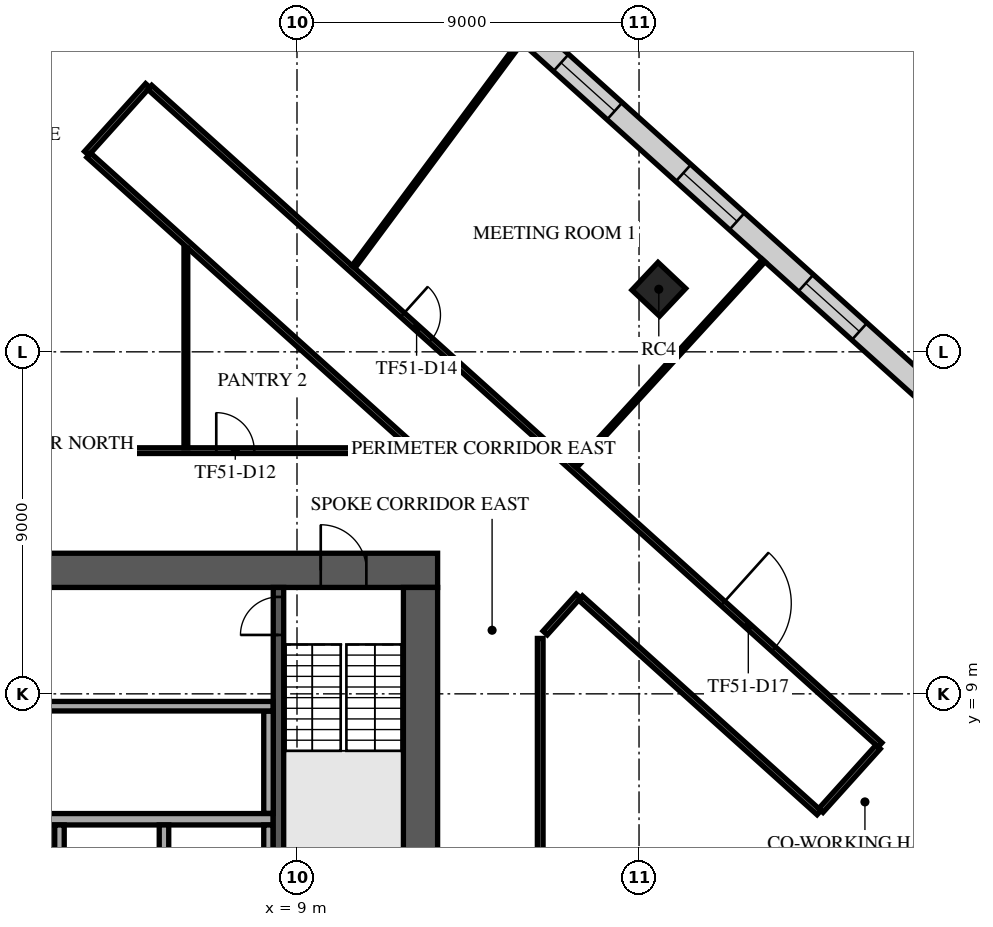
"""IFC4 building model, lengths in metres.
Left out: names, types, materials, properties, quantities, classifications, styles, units other than length and angle.
Written with IfcOpenShell. Run it as: python <this file> out.ifc"""

import sys

from ifc_helpers import new_model, si_unit, direction, frame, frame_2d, origin, origin_2d, place, context, subcontext, project, spatial, rectangle, extrude, element, fill, save


model = new_model("IFC4")
c1 = context("Model", 3, precision=1e-05, world=origin(), true_north=direction((0.0, 1.0)))
c2 = subcontext(c1, "Body", "Model", "MODEL_VIEW")
j1 = project(units=[si_unit("LENGTHUNIT", "METRE"), si_unit("PLANEANGLEUNIT", "RADIAN")], contexts=[c1])
p1 = place(None, origin())
s1 = spatial("IfcSite", under=j1, at=p1, CompositionType="ELEMENT")
p2 = place(p1, origin())
s2 = spatial("IfcBuilding", under=s1, at=p2, CompositionType="ELEMENT")
p3 = place(p2, frame((0.0, 0.0, 217.3)))
s3 = spatial("IfcBuildingStorey", under=s2, at=p3, CompositionType="ELEMENT", Elevation=217.3)
p4 = place(p3, frame((18.52, 19.647, 0.0), z_axis=(0.0, 0.0, 1.0), x_axis=(0.685916152371, 0.727680583715, 0.0)))
e1 = element("IfcColumn", 1, at=p4, inside=s3, PredefinedType="COLUMN", context=c2, shape_type="SweptSolid", body=[
    extrude(rectangle(XDim=1.0, YDim=1.0, at=origin_2d()), origin(), (0.0, 0.0, 1.0), 4.0),
])
p5 = place(p3, frame((-12.7, 12.25, 0.0), z_axis=(0.0, 0.0, 1.0), x_axis=(1.0, 0.0, 0.0)))
e2 = element("IfcWall", 2, at=p5, inside=s3, PredefinedType="SHEAR", context=c2, shape_type="SweptSolid", body=[
    extrude(rectangle(XDim=25.4, YDim=0.9, at=frame_2d((12.7, 0.0))), origin(), (0.0, 0.0, 1.0), 3.62),
])
p6 = place(p5, frame((11.5, 0.0, 0.0)))
e3 = element("IfcOpeningElement", 3, at=p6, cuts=e2, PredefinedType="OPENING", context=c2, shape_type="SweptSolid", body=[
    extrude(rectangle(XDim=2.4, YDim=2.4, at=frame_2d((1.2, 1.2))), frame((0.0, 0.46, 0.0), z_axis=(0.0, -1.0, 0.0), x_axis=(1.0, 0.0, 0.0)), (0.0, 0.0, 1.0), 0.92),
])
p7 = place(p5, frame((22.325, 0.0, 0.0)))
e4 = element("IfcOpeningElement", 4, at=p7, cuts=e2, PredefinedType="OPENING", context=c2, shape_type="SweptSolid", body=[
    extrude(rectangle(XDim=1.2, YDim=2.1, at=frame_2d((0.6, 1.05))), frame((0.0, 0.46, 0.0), z_axis=(0.0, -1.0, 0.0), x_axis=(1.0, 0.0, 0.0)), (0.0, 0.0, 1.0), 0.92),
])
p8 = place(p5, frame((1.3, 0.0, 0.0)))
e5 = element("IfcOpeningElement", 5, at=p8, cuts=e2, PredefinedType="OPENING", context=c2, shape_type="SweptSolid", body=[
    extrude(rectangle(XDim=1.0, YDim=2.1, at=frame_2d((0.5, 1.05))), frame((0.0, 0.46, 0.0), z_axis=(0.0, -1.0, 0.0), x_axis=(1.0, 0.0, 0.0)), (0.0, 0.0, 1.0), 0.92),
])
p9 = place(p3, frame((12.25, -11.8, 0.0), z_axis=(0.0, 0.0, 1.0), x_axis=(0.0, 1.0, 0.0)))
e6 = element("IfcWall", 6, at=p9, inside=s3, PredefinedType="SHEAR", context=c2, shape_type="SweptSolid", body=[
    extrude(rectangle(XDim=23.6, YDim=0.9, at=frame_2d((11.8, 0.0))), origin(), (0.0, 0.0, 1.0), 3.62),
])
p10 = place(p9, frame((10.6, 0.0, 0.0)))
e7 = element("IfcOpeningElement", 7, at=p10, cuts=e6, PredefinedType="OPENING", context=c2, shape_type="SweptSolid", body=[
    extrude(rectangle(XDim=2.4, YDim=2.4, at=frame_2d((1.2, 1.2))), frame((0.0, 0.46, 0.0), z_axis=(0.0, -1.0, 0.0), x_axis=(1.0, 0.0, 0.0)), (0.0, 0.0, 1.0), 0.92),
])
p11 = place(p3, frame((-8.375, 5.7, 0.0), z_axis=(0.0, 0.0, 1.0), x_axis=(1.0, 0.0, 0.0)))
e8 = element("IfcWall", 8, at=p11, inside=s3, PredefinedType="SOLIDWALL", context=c2, shape_type="SweptSolid", body=[
    extrude(rectangle(XDim=16.75, YDim=0.3, at=frame_2d((8.375, 0.0))), origin(), (0.0, 0.0, 1.0), 3.62),
])
for number, where, z_axis, x_axis in (
    (9, (2.75, 2.85, 0.0), (0.0, 0.0, 1.0), (0.0, 1.0, 0.0)),
    (10, (5.5, 2.85, 0.0), (0.0, 0.0, 1.0), (0.0, 1.0, 0.0)),
    (11, (8.25, 2.85, 0.0), (0.0, 0.0, 1.0), (0.0, 1.0, 0.0)),
):
    element("IfcWall", number, at=place(p3, frame(where, z_axis=z_axis, x_axis=x_axis)), inside=s3, PredefinedType="SOLIDWALL", context=c2, shape_type="SweptSolid", body=[
        extrude(rectangle(XDim=2.7, YDim=0.25, at=frame_2d((1.35, 0.0))), origin(), (0.0, 0.0, 1.0), 3.62),
    ])
p12 = place(p3, frame((8.512, 4.55, 0.0), z_axis=(0.0, 0.0, 1.0), x_axis=(0.0, 1.0, 0.0)))
e12 = element("IfcWall", 12, at=p12, inside=s3, PredefinedType="SOLIDWALL", context=c2, shape_type="SweptSolid", body=[
    extrude(rectangle(XDim=7.25, YDim=0.275, at=frame_2d((3.625, 0.0))), origin(), (0.0, 0.0, 1.0), 3.62),
])
p13 = place(p12, frame((6.0, 0.0, 0.0)))
e13 = element("IfcOpeningElement", 13, at=p13, cuts=e12, PredefinedType="OPENING", context=c2, shape_type="SweptSolid", body=[
    extrude(rectangle(XDim=1.0, YDim=2.1, at=frame_2d((0.5, 1.05))), frame((0.0, 0.147, 0.0), z_axis=(0.0, -1.0, 0.0), x_axis=(1.0, 0.0, 0.0)), (0.0, 0.0, 1.0), 0.295),
])
p14 = place(p3, frame((8.25, 5.855, 0.0), z_axis=(0.0, 0.0, 1.0), x_axis=(0.0, 1.0, 0.0)))
e14 = element("IfcWall", 14, at=p14, inside=s3, PredefinedType="PARTITIONING", context=c2, shape_type="SweptSolid", body=[
    extrude(rectangle(XDim=2.69, YDim=0.25, at=frame_2d((1.345, 0.0))), origin(), (0.0, 0.0, 1.0), 3.62),
])
p15 = place(p3, frame((-8.35, 8.675, 0.0), z_axis=(0.0, 0.0, 1.0), x_axis=(1.0, 0.0, 0.0)))
e15 = element("IfcWall", 15, at=p15, inside=s3, PredefinedType="PARTITIONING", context=c2, shape_type="SweptSolid", body=[
    extrude(rectangle(XDim=16.72, YDim=0.25, at=frame_2d((8.36, 0.0))), origin(), (0.0, 0.0, 1.0), 3.62),
])
p16 = place(p15, frame((0.875, 0.0, 0.0)))
e16 = element("IfcOpeningElement", 16, at=p16, cuts=e15, PredefinedType="OPENING", context=c2, shape_type="SweptSolid", body=[
    extrude(rectangle(XDim=1.2, YDim=2.1, at=frame_2d((0.6, 1.05))), frame((0.0, 0.135, 0.0), z_axis=(0.0, -1.0, 0.0), x_axis=(1.0, 0.0, 0.0)), (0.0, 0.0, 1.0), 0.27),
])
p17 = place(p15, frame((9.125, 0.0, 0.0)))
e17 = element("IfcOpeningElement", 17, at=p17, cuts=e15, PredefinedType="OPENING", context=c2, shape_type="SweptSolid", body=[
    extrude(rectangle(XDim=1.2, YDim=2.1, at=frame_2d((0.6, 1.05))), frame((0.0, 0.135, 0.0), z_axis=(0.0, -1.0, 0.0), x_axis=(1.0, 0.0, 0.0)), (0.0, 0.0, 1.0), 0.27),
])
p18 = place(p3, frame((34.365, 9.023, 0.0), z_axis=(0.0, 0.0, 1.0), x_axis=(-0.743146896498, 0.66912830625, 0.0)))
e18 = element("IfcWall", 18, at=p18, inside=s3, PredefinedType="STANDARD", context=c2, shape_type="SweptSolid", body=[
    extrude(rectangle(XDim=39.0, YDim=0.6, at=frame_2d((19.5, 0.0))), origin(), (0.0, 0.0, 1.0), 3.62),
])
p19 = place(p18, frame((1.217, 0.0, 0.9)))
e19 = element("IfcOpeningElement", 19, at=p19, cuts=e18, PredefinedType="OPENING", context=c2, shape_type="SweptSolid", body=[
    extrude(rectangle(XDim=1.9, YDim=2.1, at=frame_2d((0.95, 1.05))), frame((0.0, 0.31, 0.0), z_axis=(0.0, -1.0, 0.0), x_axis=(1.0, 0.0, 0.0)), (0.0, 0.0, 1.0), 0.62),
])
p20 = place(p18, frame((5.55, 0.0, 0.9)))
e20 = element("IfcOpeningElement", 20, at=p20, cuts=e18, PredefinedType="OPENING", context=c2, shape_type="SweptSolid", body=[
    extrude(rectangle(XDim=1.9, YDim=2.1, at=frame_2d((0.95, 1.05))), frame((0.0, 0.31, 0.0), z_axis=(0.0, -1.0, 0.0), x_axis=(1.0, 0.0, 0.0)), (0.0, 0.0, 1.0), 0.62),
])
p21 = place(p18, frame((9.883, 0.0, 0.9)))
e21 = element("IfcOpeningElement", 21, at=p21, cuts=e18, PredefinedType="OPENING", context=c2, shape_type="SweptSolid", body=[
    extrude(rectangle(XDim=1.9, YDim=2.1, at=frame_2d((0.95, 1.05))), frame((0.0, 0.31, 0.0), z_axis=(0.0, -1.0, 0.0), x_axis=(1.0, 0.0, 0.0)), (0.0, 0.0, 1.0), 0.62),
])
p22 = place(p18, frame((14.217, 0.0, 0.9)))
e22 = element("IfcOpeningElement", 22, at=p22, cuts=e18, PredefinedType="OPENING", context=c2, shape_type="SweptSolid", body=[
    extrude(rectangle(XDim=1.9, YDim=2.1, at=frame_2d((0.95, 1.05))), frame((0.0, 0.31, 0.0), z_axis=(0.0, -1.0, 0.0), x_axis=(1.0, 0.0, 0.0)), (0.0, 0.0, 1.0), 0.62),
])
p23 = place(p18, frame((18.55, 0.0, 0.9)))
e23 = element("IfcOpeningElement", 23, at=p23, cuts=e18, PredefinedType="OPENING", context=c2, shape_type="SweptSolid", body=[
    extrude(rectangle(XDim=1.9, YDim=2.1, at=frame_2d((0.95, 1.05))), frame((0.0, 0.31, 0.0), z_axis=(0.0, -1.0, 0.0), x_axis=(1.0, 0.0, 0.0)), (0.0, 0.0, 1.0), 0.62),
])
p24 = place(p18, frame((22.883, 0.0, 0.9)))
e24 = element("IfcOpeningElement", 24, at=p24, cuts=e18, PredefinedType="OPENING", context=c2, shape_type="SweptSolid", body=[
    extrude(rectangle(XDim=1.9, YDim=2.1, at=frame_2d((0.95, 1.05))), frame((0.0, 0.31, 0.0), z_axis=(0.0, -1.0, 0.0), x_axis=(1.0, 0.0, 0.0)), (0.0, 0.0, 1.0), 0.62),
])
p25 = place(p18, frame((27.217, 0.0, 0.9)))
e25 = element("IfcOpeningElement", 25, at=p25, cuts=e18, PredefinedType="OPENING", context=c2, shape_type="SweptSolid", body=[
    extrude(rectangle(XDim=1.9, YDim=2.1, at=frame_2d((0.95, 1.05))), frame((0.0, 0.31, 0.0), z_axis=(0.0, -1.0, 0.0), x_axis=(1.0, 0.0, 0.0)), (0.0, 0.0, 1.0), 0.62),
])
p26 = place(p18, frame((31.55, 0.0, 0.9)))
e26 = element("IfcOpeningElement", 26, at=p26, cuts=e18, PredefinedType="OPENING", context=c2, shape_type="SweptSolid", body=[
    extrude(rectangle(XDim=1.9, YDim=2.1, at=frame_2d((0.95, 1.05))), frame((0.0, 0.31, 0.0), z_axis=(0.0, -1.0, 0.0), x_axis=(1.0, 0.0, 0.0)), (0.0, 0.0, 1.0), 0.62),
])
p27 = place(p18, frame((35.883, 0.0, 0.9)))
e27 = element("IfcOpeningElement", 27, at=p27, cuts=e18, PredefinedType="OPENING", context=c2, shape_type="SweptSolid", body=[
    extrude(rectangle(XDim=1.9, YDim=2.1, at=frame_2d((0.95, 1.05))), frame((0.0, 0.31, 0.0), z_axis=(0.0, -1.0, 0.0), x_axis=(1.0, 0.0, 0.0)), (0.0, 0.0, 1.0), 0.62),
])
p28 = place(p3, frame((-8.778, 15.4, 0.0), z_axis=(0.0, 0.0, 1.0), x_axis=(1.0, 0.0, 0.0)))
e28 = element("IfcWall", 28, at=p28, inside=s3, PredefinedType="PARTITIONING", context=c2, shape_type="SweptSolid", body=[
    extrude(rectangle(XDim=20.934, YDim=0.15, at=frame_2d((10.467, 0.0))), origin(), (0.0, 0.0, 1.0), 3.17),
])
p29 = place(p28, frame((15.654, 0.0, 0.0)))
e29 = element("IfcOpeningElement", 29, at=p29, cuts=e28, PredefinedType="OPENING", context=c2, shape_type="SweptSolid", body=[
    extrude(rectangle(XDim=1.0, YDim=2.1, at=frame_2d((0.5, 1.05))), frame((0.0, 0.085, 0.0), z_axis=(0.0, -1.0, 0.0), x_axis=(1.0, 0.0, 0.0)), (0.0, 0.0, 1.0), 0.17),
])
p30 = place(p3, frame((3.466, 23.224, 0.0), z_axis=(0.0, 0.0, 1.0), x_axis=(0.669060256522, 0.743208162726, 0.0)))
e30 = element("IfcWall", 30, at=p30, inside=s3, PredefinedType="PARTITIONING", context=c2, shape_type="SweptSolid", body=[
    extrude(rectangle(XDim=2.4, YDim=0.15, at=frame_2d((1.2, 0.0))), origin(), (0.0, 0.0, 1.0), 3.62),
])
p31 = place(p3, frame((3.522, 23.174, 0.0), z_axis=(0.0, 0.0, 1.0), x_axis=(0.743165539408, -0.669107600492, 0.0)))
e31 = element("IfcWall", 31, at=p31, inside=s3, PredefinedType="PARTITIONING", context=c2, shape_type="SweptSolid", body=[
    extrude(rectangle(XDim=11.423, YDim=0.15, at=frame_2d((5.711, 0.0))), origin(), (0.0, 0.0, 1.0), 3.17),
])
p32 = place(p3, frame((5.128, 24.958, 0.0), z_axis=(0.0, 0.0, 1.0), x_axis=(0.743144813636, -0.66913061951, 0.0)))
e32 = element("IfcWall", 32, at=p32, inside=s3, PredefinedType="PARTITIONING", context=c2, shape_type="SweptSolid", body=[
    extrude(rectangle(XDim=25.854, YDim=0.15, at=frame_2d((12.927, 0.0))), origin(), (0.0, 0.0, 1.0), 3.17),
])
p33 = place(p32, frame((8.946, 0.0, 0.0)))
e33 = element("IfcOpeningElement", 33, at=p33, cuts=e32, PredefinedType="OPENING", context=c2, shape_type="SweptSolid", body=[
    extrude(rectangle(XDim=1.0, YDim=2.1, at=frame_2d((0.5, 1.05))), frame((0.0, 0.085, 0.0), z_axis=(0.0, -1.0, 0.0), x_axis=(1.0, 0.0, 0.0)), (0.0, 0.0, 1.0), 0.17),
])
p34 = place(p32, frame((20.29, 0.0, 0.0)))
e34 = element("IfcOpeningElement", 34, at=p34, cuts=e32, PredefinedType="OPENING", context=c2, shape_type="SweptSolid", body=[
    extrude(rectangle(XDim=1.8, YDim=2.1, at=frame_2d((0.9, 1.05))), frame((0.0, 0.085, 0.0), z_axis=(0.0, -1.0, 0.0), x_axis=(1.0, 0.0, 0.0)), (0.0, 0.0, 1.0), 0.17),
])
p35 = place(p3, frame((15.4, -7.851, 0.0), z_axis=(0.0, 0.0, 1.0), x_axis=(0.0, 1.0, 0.0)))
e35 = element("IfcWall", 35, at=p35, inside=s3, PredefinedType="PARTITIONING", context=c2, shape_type="SweptSolid", body=[
    extrude(rectangle(XDim=18.309, YDim=0.15, at=frame_2d((9.154, 0.0))), origin(), (0.0, 0.0, 1.0), 3.17),
])
p36 = place(p3, frame((15.531, 10.603, 0.0), z_axis=(0.0, 0.0, 1.0), x_axis=(0.669233140763, 0.743052490275, 0.0)))
e36 = element("IfcWall", 36, at=p36, inside=s3, PredefinedType="PARTITIONING", context=c2, shape_type="SweptSolid", body=[
    extrude(rectangle(XDim=1.306, YDim=0.15, at=frame_2d((0.653, 0.0))), origin(), (0.0, 0.0, 1.0), 3.17),
])
p37 = place(p3, frame((16.461, 11.524, 0.0), z_axis=(0.0, 0.0, 1.0), x_axis=(0.743193483902, -0.669076561752, 0.0)))
e37 = element("IfcWall", 37, at=p37, inside=s3, PredefinedType="PARTITIONING", context=c2, shape_type="SweptSolid", body=[
    extrude(rectangle(XDim=8.442, YDim=0.15, at=frame_2d((4.221, 0.0))), origin(), (0.0, 0.0, 1.0), 3.17),
])
p38 = place(p3, frame((22.785, 5.931, 0.0), z_axis=(0.0, 0.0, 1.0), x_axis=(0.669246477345, 0.743040478414, 0.0)))
e38 = element("IfcWall", 38, at=p38, inside=s3, PredefinedType="PARTITIONING", context=c2, shape_type="SweptSolid", body=[
    extrude(rectangle(XDim=2.25, YDim=0.15, at=frame_2d((1.125, 0.0))), origin(), (0.0, 0.0, 1.0), 3.17),
])
p39 = place(p3, frame((6.076, 15.475, 0.0), z_axis=(0.0, 0.0, 1.0), x_axis=(0.0, 1.0, 0.0)))
e39 = element("IfcWall", 39, at=p39, inside=s3, PredefinedType="PARTITIONING", context=c2, shape_type="SweptSolid", body=[
    extrude(rectangle(XDim=5.253, YDim=0.1, at=frame_2d((2.626, 0.0))), origin(), (0.0, 0.0, 1.0), 3.17),
])
p40 = place(p3, frame((10.489, 20.238, 0.0), z_axis=(0.0, 0.0, 1.0), x_axis=(0.595992284238, 0.802990160045, 0.0)))
e40 = element("IfcWall", 40, at=p40, inside=s3, PredefinedType="PARTITIONING", context=c2, shape_type="SweptSolid", body=[
    extrude(rectangle(XDim=7.373, YDim=0.1, at=frame_2d((3.686, 0.0))), origin(), (0.0, 0.0, 1.0), 2.97),
])
p41 = place(p3, frame((16.319, 14.983, 0.0), z_axis=(0.0, 0.0, 1.0), x_axis=(0.675134344503, 0.737694799272, 0.0)))
e41 = element("IfcWall", 41, at=p41, inside=s3, PredefinedType="PARTITIONING", context=c2, shape_type="SweptSolid", body=[
    extrude(rectangle(XDim=7.344, YDim=0.1, at=frame_2d((3.672, 0.0))), origin(), (0.0, 0.0, 1.0), 2.97),
])
p42 = place(p7, origin())
e42 = element("IfcDoor", 42, at=p42, inside=s3, OperationType="SINGLE_SWING_LEFT", PredefinedType="DOOR", context=c2, shape_type="SweptSolid", body=[
    extrude(rectangle(XDim=1.2, YDim=2.1, at=frame_2d((0.6, 1.05))), frame((0.0, 0.025, 0.0), z_axis=(0.0, -1.0, 0.0), x_axis=(1.0, 0.0, 0.0)), (0.0, 0.0, 1.0), 0.05),
])
fill(e4, e42)
p43 = place(p13, origin())
e43 = element("IfcDoor", 43, at=p43, inside=s3, OperationType="SINGLE_SWING_LEFT", PredefinedType="DOOR", context=c2, shape_type="SweptSolid", body=[
    extrude(rectangle(XDim=1.0, YDim=2.1, at=frame_2d((0.5, 1.05))), frame((0.0, 0.025, 0.0), z_axis=(0.0, -1.0, 0.0), x_axis=(1.0, 0.0, 0.0)), (0.0, 0.0, 1.0), 0.05),
])
fill(e13, e43)
p44 = place(p22, origin())
e44 = element("IfcWindow", 44, at=p44, inside=s3, PartitioningType="SINGLE_PANEL", PredefinedType="WINDOW", context=c2, shape_type="SweptSolid", body=[
    extrude(rectangle(XDim=1.9, YDim=2.1, at=frame_2d((0.95, 1.05))), frame((0.0, 0.03, 0.0), z_axis=(0.0, -1.0, 0.0), x_axis=(1.0, 0.0, 0.0)), (0.0, 0.0, 1.0), 0.06),
])
fill(e22, e44)
p45 = place(p23, origin())
e45 = element("IfcWindow", 45, at=p45, inside=s3, PartitioningType="SINGLE_PANEL", PredefinedType="WINDOW", context=c2, shape_type="SweptSolid", body=[
    extrude(rectangle(XDim=1.9, YDim=2.1, at=frame_2d((0.95, 1.05))), frame((0.0, 0.03, 0.0), z_axis=(0.0, -1.0, 0.0), x_axis=(1.0, 0.0, 0.0)), (0.0, 0.0, 1.0), 0.06),
])
fill(e23, e45)
p46 = place(p24, origin())
e46 = element("IfcWindow", 46, at=p46, inside=s3, PartitioningType="SINGLE_PANEL", PredefinedType="WINDOW", context=c2, shape_type="SweptSolid", body=[
    extrude(rectangle(XDim=1.9, YDim=2.1, at=frame_2d((0.95, 1.05))), frame((0.0, 0.03, 0.0), z_axis=(0.0, -1.0, 0.0), x_axis=(1.0, 0.0, 0.0)), (0.0, 0.0, 1.0), 0.06),
])
fill(e24, e46)
p47 = place(p29, origin())
e47 = element("IfcDoor", 47, at=p47, inside=s3, OperationType="SINGLE_SWING_LEFT", PredefinedType="DOOR", context=c2, shape_type="SweptSolid", body=[
    extrude(rectangle(XDim=1.0, YDim=2.1, at=frame_2d((0.5, 1.05))), frame((0.0, 0.025, 0.0), z_axis=(0.0, -1.0, 0.0), x_axis=(1.0, 0.0, 0.0)), (0.0, 0.0, 1.0), 0.05),
])
fill(e29, e47)
p48 = place(p33, origin())
e48 = element("IfcDoor", 48, at=p48, inside=s3, OperationType="SINGLE_SWING_RIGHT", PredefinedType="DOOR", context=c2, shape_type="SweptSolid", body=[
    extrude(rectangle(XDim=1.0, YDim=2.1, at=frame_2d((0.5, 1.05))), frame((0.0, 0.025, 0.0), z_axis=(0.0, -1.0, 0.0), x_axis=(1.0, 0.0, 0.0)), (0.0, 0.0, 1.0), 0.05),
])
fill(e33, e48)
p49 = place(p34, origin())
e49 = element("IfcDoor", 49, at=p49, inside=s3, OperationType="DOUBLE_DOOR_SINGLE_SWING", PredefinedType="DOOR", context=c2, shape_type="SweptSolid", body=[
    extrude(rectangle(XDim=1.8, YDim=2.1, at=frame_2d((0.9, 1.05))), frame((0.0, 0.025, 0.0), z_axis=(0.0, -1.0, 0.0), x_axis=(1.0, 0.0, 0.0)), (0.0, 0.0, 1.0), 0.05),
])
fill(e34, e49)
save(model, sys.argv[1])
